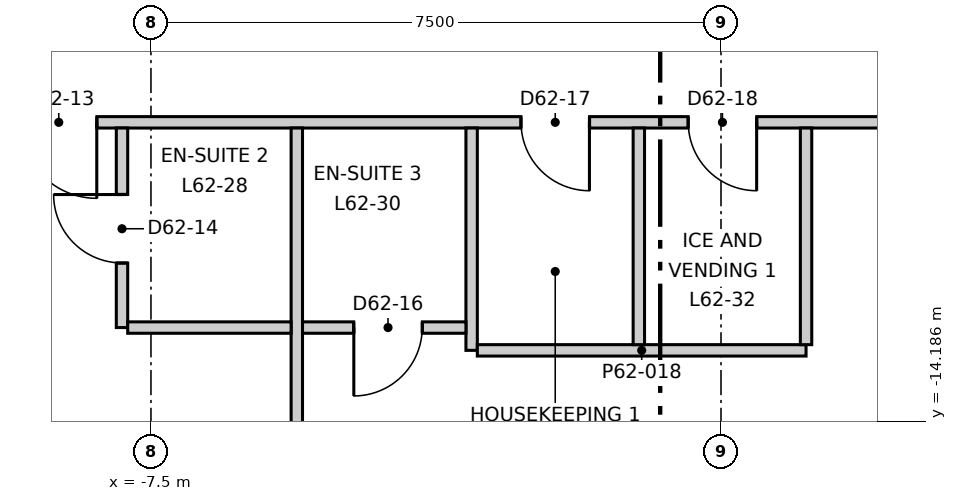
"""IFC4 building model, lengths in metres.
Left out: names, types, materials, properties, quantities, classifications, styles, units other than length and angle.
Written with IfcOpenShell. Run it as: python <this file> out.ifc"""

import sys

from ifc_helpers import new_model, si_unit, direction, frame, frame_2d, origin, place, context, subcontext, project, spatial, rectangle, extrude, element, fill, save


model = new_model("IFC4")
c1 = context("Model", 3, precision=1e-05, world=origin(), true_north=direction((0.0, 1.0)))
c2 = subcontext(c1, "Body", "Model", "MODEL_VIEW")
j1 = project(units=[si_unit("LENGTHUNIT", "METRE"), si_unit("PLANEANGLEUNIT", "RADIAN")], contexts=[c1])
p1 = place(None, origin())
s1 = spatial("IfcSite", under=j1, at=p1, CompositionType="ELEMENT")
p2 = place(p1, origin())
s2 = spatial("IfcBuilding", under=s1, at=p2, CompositionType="ELEMENT")
p3 = place(p2, frame((0.0, 0.0, 268.3)))
s3 = spatial("IfcBuildingStorey", under=s2, at=p3, CompositionType="ELEMENT", Elevation=268.3)
p4 = place(p3, frame((-2.577, 28.771, 0.0), z_axis=(0.0, 0.0, 1.0), x_axis=(-0.49999909388, -0.866025926932, 0.0)))
e1 = element("IfcWall", 1, at=p4, inside=s3, PredefinedType="ELEMENTEDWALL", context=c2, shape_type="SweptSolid", body=[
    extrude(rectangle(XDim=47.236, YDim=0.2, at=frame_2d((23.618, 0.0))), origin(), (0.0, 0.0, 1.0), 3.3),
])
p5 = place(p4, frame((2.243, 0.0, 0.9)))
e2 = element("IfcOpeningElement", 2, at=p5, cuts=e1, PredefinedType="OPENING", context=c2, shape_type="SweptSolid", body=[
    extrude(rectangle(XDim=3.7, YDim=2.2, at=frame_2d((1.85, 1.1))), frame((0.0, 0.11, 0.0), z_axis=(0.0, -1.0, 0.0), x_axis=(1.0, 0.0, 0.0)), (0.0, 0.0, 1.0), 0.22),
])
p6 = place(p4, frame((7.824, 0.0, 0.9)))
e3 = element("IfcOpeningElement", 3, at=p6, cuts=e1, PredefinedType="OPENING", context=c2, shape_type="SweptSolid", body=[
    extrude(rectangle(XDim=3.7, YDim=2.2, at=frame_2d((1.85, 1.1))), frame((0.0, 0.11, 0.0), z_axis=(0.0, -1.0, 0.0), x_axis=(1.0, 0.0, 0.0)), (0.0, 0.0, 1.0), 0.22),
])
p7 = place(p4, frame((13.406, 0.0, 0.9)))
e4 = element("IfcOpeningElement", 4, at=p7, cuts=e1, PredefinedType="OPENING", context=c2, shape_type="SweptSolid", body=[
    extrude(rectangle(XDim=3.7, YDim=2.2, at=frame_2d((1.85, 1.1))), frame((0.0, 0.11, 0.0), z_axis=(0.0, -1.0, 0.0), x_axis=(1.0, 0.0, 0.0)), (0.0, 0.0, 1.0), 0.22),
])
p8 = place(p4, frame((18.987, 0.0, 0.9)))
e5 = element("IfcOpeningElement", 5, at=p8, cuts=e1, PredefinedType="OPENING", context=c2, shape_type="SweptSolid", body=[
    extrude(rectangle(XDim=3.7, YDim=2.2, at=frame_2d((1.85, 1.1))), frame((0.0, 0.11, 0.0), z_axis=(0.0, -1.0, 0.0), x_axis=(1.0, 0.0, 0.0)), (0.0, 0.0, 1.0), 0.22),
])
p9 = place(p4, frame((24.569, 0.0, 0.9)))
e6 = element("IfcOpeningElement", 6, at=p9, cuts=e1, PredefinedType="OPENING", context=c2, shape_type="SweptSolid", body=[
    extrude(rectangle(XDim=3.7, YDim=2.2, at=frame_2d((1.85, 1.1))), frame((0.0, 0.11, 0.0), z_axis=(0.0, -1.0, 0.0), x_axis=(1.0, 0.0, 0.0)), (0.0, 0.0, 1.0), 0.22),
])
p10 = place(p4, frame((30.15, 0.0, 0.9)))
e7 = element("IfcOpeningElement", 7, at=p10, cuts=e1, PredefinedType="OPENING", context=c2, shape_type="SweptSolid", body=[
    extrude(rectangle(XDim=3.7, YDim=2.2, at=frame_2d((1.85, 1.1))), frame((0.0, 0.11, 0.0), z_axis=(0.0, -1.0, 0.0), x_axis=(1.0, 0.0, 0.0)), (0.0, 0.0, 1.0), 0.22),
])
p11 = place(p4, frame((35.731, 0.0, 0.9)))
e8 = element("IfcOpeningElement", 8, at=p11, cuts=e1, PredefinedType="OPENING", context=c2, shape_type="SweptSolid", body=[
    extrude(rectangle(XDim=3.7, YDim=2.2, at=frame_2d((1.85, 1.1))), frame((0.0, 0.11, 0.0), z_axis=(0.0, -1.0, 0.0), x_axis=(1.0, 0.0, 0.0)), (0.0, 0.0, 1.0), 0.22),
])
p12 = place(p4, frame((41.313, 0.0, 0.9)))
e9 = element("IfcOpeningElement", 9, at=p12, cuts=e1, PredefinedType="OPENING", context=c2, shape_type="SweptSolid", body=[
    extrude(rectangle(XDim=3.7, YDim=2.2, at=frame_2d((1.85, 1.1))), frame((0.0, 0.11, 0.0), z_axis=(0.0, -1.0, 0.0), x_axis=(1.0, 0.0, 0.0)), (0.0, 0.0, 1.0), 0.22),
])
p13 = place(p3, frame((-17.678, -10.12, 0.0), z_axis=(0.0, 0.0, 1.0), x_axis=(0.49998824015, 0.86603219323, 0.0)))
e10 = element("IfcWall", 10, at=p13, inside=s3, PredefinedType="PARTITIONING", context=c2, shape_type="SweptSolid", body=[
    extrude(rectangle(XDim=35.357, YDim=0.15, at=frame_2d((17.678, 0.0))), origin(), (0.0, 0.0, 1.0), 3.3),
])
p14 = place(p13, frame((31.607, 0.0, 0.0)))
e11 = element("IfcOpeningElement", 11, at=p14, cuts=e10, PredefinedType="OPENING", context=c2, shape_type="SweptSolid", body=[
    extrude(rectangle(XDim=1.0, YDim=2.1, at=frame_2d((0.5, 1.05))), frame((0.0, 0.085, 0.0), z_axis=(0.0, -1.0, 0.0), x_axis=(1.0, 0.0, 0.0)), (0.0, 0.0, 1.0), 0.17),
])
p15 = place(p13, frame((19.416, 0.0, 0.0)))
e12 = element("IfcOpeningElement", 12, at=p15, cuts=e10, PredefinedType="OPENING", context=c2, shape_type="SweptSolid", body=[
    extrude(rectangle(XDim=1.0, YDim=2.1, at=frame_2d((0.5, 1.05))), frame((0.0, 0.085, 0.0), z_axis=(0.0, -1.0, 0.0), x_axis=(1.0, 0.0, 0.0)), (0.0, 0.0, 1.0), 0.17),
])
p16 = place(p13, frame((24.916, 0.0, 0.0)))
e13 = element("IfcOpeningElement", 13, at=p16, cuts=e10, PredefinedType="OPENING", context=c2, shape_type="SweptSolid", body=[
    extrude(rectangle(XDim=0.9, YDim=2.1, at=frame_2d((0.45, 1.05))), frame((0.0, 0.085, 0.0), z_axis=(0.0, -1.0, 0.0), x_axis=(1.0, 0.0, 0.0)), (0.0, 0.0, 1.0), 0.17),
])
p17 = place(p13, frame((22.816, 0.0, 0.0)))
e14 = element("IfcOpeningElement", 14, at=p17, cuts=e10, PredefinedType="OPENING", context=c2, shape_type="SweptSolid", body=[
    extrude(rectangle(XDim=0.9, YDim=2.1, at=frame_2d((0.45, 1.05))), frame((0.0, 0.085, 0.0), z_axis=(0.0, -1.0, 0.0), x_axis=(1.0, 0.0, 0.0)), (0.0, 0.0, 1.0), 0.17),
])
p18 = place(p13, frame((14.654, 0.0, 0.0)))
e15 = element("IfcOpeningElement", 15, at=p18, cuts=e10, PredefinedType="OPENING", context=c2, shape_type="SweptSolid", body=[
    extrude(rectangle(XDim=1.0, YDim=2.1, at=frame_2d((0.5, 1.05))), frame((0.0, 0.085, 0.0), z_axis=(0.0, -1.0, 0.0), x_axis=(1.0, 0.0, 0.0)), (0.0, 0.0, 1.0), 0.17),
])
p19 = place(p13, frame((7.672, 0.0, 0.0)))
e16 = element("IfcOpeningElement", 16, at=p19, cuts=e10, PredefinedType="OPENING", context=c2, shape_type="SweptSolid", body=[
    extrude(rectangle(XDim=1.0, YDim=2.1, at=frame_2d((0.5, 1.05))), frame((0.0, 0.085, 0.0), z_axis=(0.0, -1.0, 0.0), x_axis=(1.0, 0.0, 0.0)), (0.0, 0.0, 1.0), 0.17),
])
p20 = place(p13, frame((2.69, 0.0, 0.0)))
e17 = element("IfcOpeningElement", 17, at=p20, cuts=e10, PredefinedType="OPENING", context=c2, shape_type="SweptSolid", body=[
    extrude(rectangle(XDim=1.0, YDim=2.1, at=frame_2d((0.5, 1.05))), frame((0.0, 0.085, 0.0), z_axis=(0.0, -1.0, 0.0), x_axis=(1.0, 0.0, 0.0)), (0.0, 0.0, 1.0), 0.17),
])
p21 = place(p3, frame((-17.604, -10.25, 0.0), z_axis=(0.0, 0.0, 1.0), x_axis=(1.0, 0.0, 0.0)))
e18 = element("IfcWall", 18, at=p21, inside=s3, PredefinedType="PARTITIONING", context=c2, shape_type="SweptSolid", body=[
    extrude(rectangle(XDim=35.358, YDim=0.15, at=frame_2d((17.679, 0.0))), origin(), (0.0, 0.0, 1.0), 3.3),
])
p22 = place(p21, frame((2.6, 0.0, 0.0)))
e19 = element("IfcOpeningElement", 19, at=p22, cuts=e18, PredefinedType="OPENING", context=c2, shape_type="SweptSolid", body=[
    extrude(rectangle(XDim=1.0, YDim=2.1, at=frame_2d((0.5, 1.05))), frame((0.0, 0.085, 0.0), z_axis=(0.0, -1.0, 0.0), x_axis=(1.0, 0.0, 0.0)), (0.0, 0.0, 1.0), 0.17),
])
p23 = place(p21, frame((8.391, 0.0, 0.0)))
e20 = element("IfcOpeningElement", 20, at=p23, cuts=e18, PredefinedType="OPENING", context=c2, shape_type="SweptSolid", body=[
    extrude(rectangle(XDim=1.0, YDim=2.1, at=frame_2d((0.5, 1.05))), frame((0.0, 0.085, 0.0), z_axis=(0.0, -1.0, 0.0), x_axis=(1.0, 0.0, 0.0)), (0.0, 0.0, 1.0), 0.17),
])
p24 = place(p21, frame((20.473, 0.0, 0.0)))
e21 = element("IfcOpeningElement", 21, at=p24, cuts=e18, PredefinedType="OPENING", context=c2, shape_type="SweptSolid", body=[
    extrude(rectangle(XDim=1.0, YDim=2.1, at=frame_2d((0.5, 1.05))), frame((0.0, 0.085, 0.0), z_axis=(0.0, -1.0, 0.0), x_axis=(1.0, 0.0, 0.0)), (0.0, 0.0, 1.0), 0.17),
])
p25 = place(p21, frame((14.973, 0.0, 0.0)))
e22 = element("IfcOpeningElement", 22, at=p25, cuts=e18, PredefinedType="OPENING", context=c2, shape_type="SweptSolid", body=[
    extrude(rectangle(XDim=0.9, YDim=2.1, at=frame_2d((0.45, 1.05))), frame((0.0, 0.085, 0.0), z_axis=(0.0, -1.0, 0.0), x_axis=(1.0, 0.0, 0.0)), (0.0, 0.0, 1.0), 0.17),
])
p26 = place(p21, frame((17.173, 0.0, 0.0)))
e23 = element("IfcOpeningElement", 23, at=p26, cuts=e18, PredefinedType="OPENING", context=c2, shape_type="SweptSolid", body=[
    extrude(rectangle(XDim=0.9, YDim=2.1, at=frame_2d((0.45, 1.05))), frame((0.0, 0.085, 0.0), z_axis=(0.0, -1.0, 0.0), x_axis=(1.0, 0.0, 0.0)), (0.0, 0.0, 1.0), 0.17),
])
p27 = place(p21, frame((28.735, 0.0, 0.0)))
e24 = element("IfcOpeningElement", 24, at=p27, cuts=e18, PredefinedType="OPENING", context=c2, shape_type="SweptSolid", body=[
    extrude(rectangle(XDim=1.0, YDim=2.1, at=frame_2d((0.5, 1.05))), frame((0.0, 0.085, 0.0), z_axis=(0.0, -1.0, 0.0), x_axis=(1.0, 0.0, 0.0)), (0.0, 0.0, 1.0), 0.17),
])
p28 = place(p3, frame((-5.581, -16.537, 0.0), z_axis=(0.0, 0.0, 1.0), x_axis=(0.0, 1.0, 0.0)))
e25 = element("IfcWall", 25, at=p28, inside=s3, PredefinedType="PARTITIONING", context=c2, shape_type="SweptSolid", body=[
    extrude(rectangle(XDim=6.212, YDim=0.15, at=frame_2d((3.106, 0.0))), origin(), (0.0, 0.0, 1.0), 3.3),
])
p29 = place(p3, frame((-3.281, -13.25, 0.0), z_axis=(0.0, 0.0, 1.0), x_axis=(0.0, 1.0, 0.0)))
e26 = element("IfcWall", 26, at=p29, inside=s3, PredefinedType="PARTITIONING", context=c2, shape_type="SweptSolid", body=[
    extrude(rectangle(XDim=2.925, YDim=0.15, at=frame_2d((1.462, 0.0))), origin(), (0.0, 0.0, 1.0), 3.3),
])
p30 = place(p3, frame((-3.206, -13.25, 0.0), z_axis=(0.0, 0.0, 1.0), x_axis=(1.0, 0.0, 0.0)))
e27 = element("IfcWall", 27, at=p30, inside=s3, PredefinedType="PARTITIONING", context=c2, shape_type="SweptSolid", body=[
    extrude(rectangle(XDim=4.325, YDim=0.15, at=frame_2d((2.163, 0.0))), origin(), (0.0, 0.0, 1.0), 3.3),
])
for number, where, z_axis, x_axis in (
    (28, (1.119, -13.175, 0.0), (0.0, 0.0, 1.0), (0.0, 1.0, 0.0)),
    (29, (-1.081, -13.175, 0.0), (0.0, 0.0, 1.0), (0.0, 1.0, 0.0)),
):
    element("IfcWall", number, at=place(p3, frame(where, z_axis=z_axis, x_axis=x_axis)), inside=s3, PredefinedType="PARTITIONING", context=c2, shape_type="SweptSolid", body=[
        extrude(rectangle(XDim=2.85, YDim=0.15, at=frame_2d((1.425, 0.0))), origin(), (0.0, 0.0, 1.0), 3.3),
    ])
p31 = place(p3, frame((0.075, 20.37, 0.0), z_axis=(0.0, 0.0, 1.0), x_axis=(0.499988971979, -0.866031770721, 0.0)))
e30 = element("IfcWall", 30, at=p31, inside=s3, PredefinedType="PARTITIONING", context=c2, shape_type="SweptSolid", body=[
    extrude(rectangle(XDim=35.207, YDim=0.15, at=frame_2d((17.604, 0.0))), origin(), (0.0, 0.0, 1.0), 3.3),
])
p32 = place(p31, frame((31.606, 0.0, 0.0)))
e31 = element("IfcOpeningElement", 31, at=p32, cuts=e30, PredefinedType="OPENING", context=c2, shape_type="SweptSolid", body=[
    extrude(rectangle(XDim=1.0, YDim=2.1, at=frame_2d((0.5, 1.05))), frame((0.0, 0.085, 0.0), z_axis=(0.0, -1.0, 0.0), x_axis=(1.0, 0.0, 0.0)), (0.0, 0.0, 1.0), 0.17),
])
p33 = place(p31, frame((24.316, 0.0, 0.0)))
e32 = element("IfcOpeningElement", 32, at=p33, cuts=e30, PredefinedType="OPENING", context=c2, shape_type="SweptSolid", body=[
    extrude(rectangle(XDim=1.0, YDim=2.1, at=frame_2d((0.5, 1.05))), frame((0.0, 0.085, 0.0), z_axis=(0.0, -1.0, 0.0), x_axis=(1.0, 0.0, 0.0)), (0.0, 0.0, 1.0), 0.17),
])
p34 = place(p31, frame((18.735, 0.0, 0.0)))
e33 = element("IfcOpeningElement", 33, at=p34, cuts=e30, PredefinedType="OPENING", context=c2, shape_type="SweptSolid", body=[
    extrude(rectangle(XDim=1.0, YDim=2.1, at=frame_2d((0.5, 1.05))), frame((0.0, 0.085, 0.0), z_axis=(0.0, -1.0, 0.0), x_axis=(1.0, 0.0, 0.0)), (0.0, 0.0, 1.0), 0.17),
])
p35 = place(p31, frame((8.154, 0.0, 0.0)))
e34 = element("IfcOpeningElement", 34, at=p35, cuts=e30, PredefinedType="OPENING", context=c2, shape_type="SweptSolid", body=[
    extrude(rectangle(XDim=1.0, YDim=2.1, at=frame_2d((0.5, 1.05))), frame((0.0, 0.085, 0.0), z_axis=(0.0, -1.0, 0.0), x_axis=(1.0, 0.0, 0.0)), (0.0, 0.0, 1.0), 0.17),
])
p36 = place(p31, frame((13.754, 0.0, 0.0)))
e35 = element("IfcOpeningElement", 35, at=p36, cuts=e30, PredefinedType="OPENING", context=c2, shape_type="SweptSolid", body=[
    extrude(rectangle(XDim=0.9, YDim=2.1, at=frame_2d((0.45, 1.05))), frame((0.0, 0.085, 0.0), z_axis=(0.0, -1.0, 0.0), x_axis=(1.0, 0.0, 0.0)), (0.0, 0.0, 1.0), 0.17),
])
p37 = place(p31, frame((11.554, 0.0, 0.0)))
e36 = element("IfcOpeningElement", 36, at=p37, cuts=e30, PredefinedType="OPENING", context=c2, shape_type="SweptSolid", body=[
    extrude(rectangle(XDim=0.9, YDim=2.1, at=frame_2d((0.45, 1.05))), frame((0.0, 0.085, 0.0), z_axis=(0.0, -1.0, 0.0), x_axis=(1.0, 0.0, 0.0)), (0.0, 0.0, 1.0), 0.17),
])
p38 = place(p31, frame((2.69, 0.0, 0.0)))
e37 = element("IfcOpeningElement", 37, at=p38, cuts=e30, PredefinedType="OPENING", context=c2, shape_type="SweptSolid", body=[
    extrude(rectangle(XDim=1.0, YDim=2.1, at=frame_2d((0.5, 1.05))), frame((0.0, 0.085, 0.0), z_axis=(0.0, -1.0, 0.0), x_axis=(1.0, 0.0, 0.0)), (0.0, 0.0, 1.0), 0.17),
])
p39 = place(p3, frame((-7.881, -12.95, 0.0), z_axis=(0.0, 0.0, 1.0), x_axis=(0.0, 1.0, 0.0)))
e38 = element("IfcWall", 38, at=p39, inside=s3, PredefinedType="PARTITIONING", context=c2, shape_type="SweptSolid", body=[
    extrude(rectangle(XDim=2.625, YDim=0.15, at=frame_2d((1.312, 0.0))), origin(), (0.0, 0.0, 1.0), 3.3),
])
p40 = place(p39, frame((0.85, 0.0, 0.0)))
e39 = element("IfcOpeningElement", 39, at=p40, cuts=e38, PredefinedType="OPENING", context=c2, shape_type="SweptSolid", body=[
    extrude(rectangle(XDim=0.9, YDim=2.1, at=frame_2d((0.45, 1.05))), frame((0.0, 0.085, 0.0), z_axis=(0.0, -1.0, 0.0), x_axis=(1.0, 0.0, 0.0)), (0.0, 0.0, 1.0), 0.17),
])
p41 = place(p3, frame((-7.806, -12.95, 0.0), z_axis=(0.0, 0.0, 1.0), x_axis=(1.0, 0.0, 0.0)))
e40 = element("IfcWall", 40, at=p41, inside=s3, PredefinedType="PARTITIONING", context=c2, shape_type="SweptSolid", body=[
    extrude(rectangle(XDim=2.15, YDim=0.15, at=frame_2d((1.075, 0.0))), origin(), (0.0, 0.0, 1.0), 3.3),
])
p42 = place(p3, frame((-5.506, -12.95, 0.0), z_axis=(0.0, 0.0, 1.0), x_axis=(1.0, 0.0, 0.0)))
e41 = element("IfcWall", 41, at=p42, inside=s3, PredefinedType="PARTITIONING", context=c2, shape_type="SweptSolid", body=[
    extrude(rectangle(XDim=2.15, YDim=0.15, at=frame_2d((1.075, 0.0))), origin(), (0.0, 0.0, 1.0), 3.3),
])
p43 = place(p42, frame((0.675, 0.0, 0.0)))
e42 = element("IfcOpeningElement", 42, at=p43, cuts=e41, PredefinedType="OPENING", context=c2, shape_type="SweptSolid", body=[
    extrude(rectangle(XDim=0.9, YDim=2.1, at=frame_2d((0.45, 1.05))), frame((0.0, 0.085, 0.0), z_axis=(0.0, -1.0, 0.0), x_axis=(1.0, 0.0, 0.0)), (0.0, 0.0, 1.0), 0.17),
])
p44 = place(p23, origin())
e43 = element("IfcDoor", 43, at=p44, inside=s3, OperationType="SINGLE_SWING_RIGHT", PredefinedType="DOOR", context=c2, shape_type="SweptSolid", body=[
    extrude(rectangle(XDim=1.0, YDim=2.1, at=frame_2d((0.5, 1.05))), frame((0.0, 0.025, 0.0), z_axis=(0.0, -1.0, 0.0), x_axis=(1.0, 0.0, 0.0)), (0.0, 0.0, 1.0), 0.05),
])
fill(e20, e43)
p45 = place(p40, origin())
e44 = element("IfcDoor", 44, at=p45, inside=s3, OperationType="SINGLE_SWING_LEFT", PredefinedType="DOOR", context=c2, shape_type="SweptSolid", body=[
    extrude(rectangle(XDim=0.9, YDim=2.1, at=frame_2d((0.45, 1.05))), frame((0.0, 0.025, 0.0), z_axis=(0.0, -1.0, 0.0), x_axis=(1.0, 0.0, 0.0)), (0.0, 0.0, 1.0), 0.05),
])
fill(e39, e44)
p46 = place(p43, origin())
e45 = element("IfcDoor", 45, at=p46, inside=s3, OperationType="SINGLE_SWING_LEFT", PredefinedType="DOOR", context=c2, shape_type="SweptSolid", body=[
    extrude(rectangle(XDim=0.9, YDim=2.1, at=frame_2d((0.45, 1.05))), frame((0.0, 0.025, 0.0), z_axis=(0.0, -1.0, 0.0), x_axis=(1.0, 0.0, 0.0)), (0.0, 0.0, 1.0), 0.05),
])
fill(e42, e45)
p47 = place(p25, origin())
e46 = element("IfcDoor", 46, at=p47, inside=s3, OperationType="SINGLE_SWING_RIGHT", PredefinedType="DOOR", context=c2, shape_type="SweptSolid", body=[
    extrude(rectangle(XDim=0.9, YDim=2.1, at=frame_2d((0.45, 1.05))), frame((0.0, 0.025, 0.0), z_axis=(0.0, -1.0, 0.0), x_axis=(1.0, 0.0, 0.0)), (0.0, 0.0, 1.0), 0.05),
])
fill(e22, e46)
p48 = place(p26, origin())
e47 = element("IfcDoor", 47, at=p48, inside=s3, OperationType="SINGLE_SWING_RIGHT", PredefinedType="DOOR", context=c2, shape_type="SweptSolid", body=[
    extrude(rectangle(XDim=0.9, YDim=2.1, at=frame_2d((0.45, 1.05))), frame((0.0, 0.025, 0.0), z_axis=(0.0, -1.0, 0.0), x_axis=(1.0, 0.0, 0.0)), (0.0, 0.0, 1.0), 0.05),
])
fill(e23, e47)
save(model, sys.argv[1])
